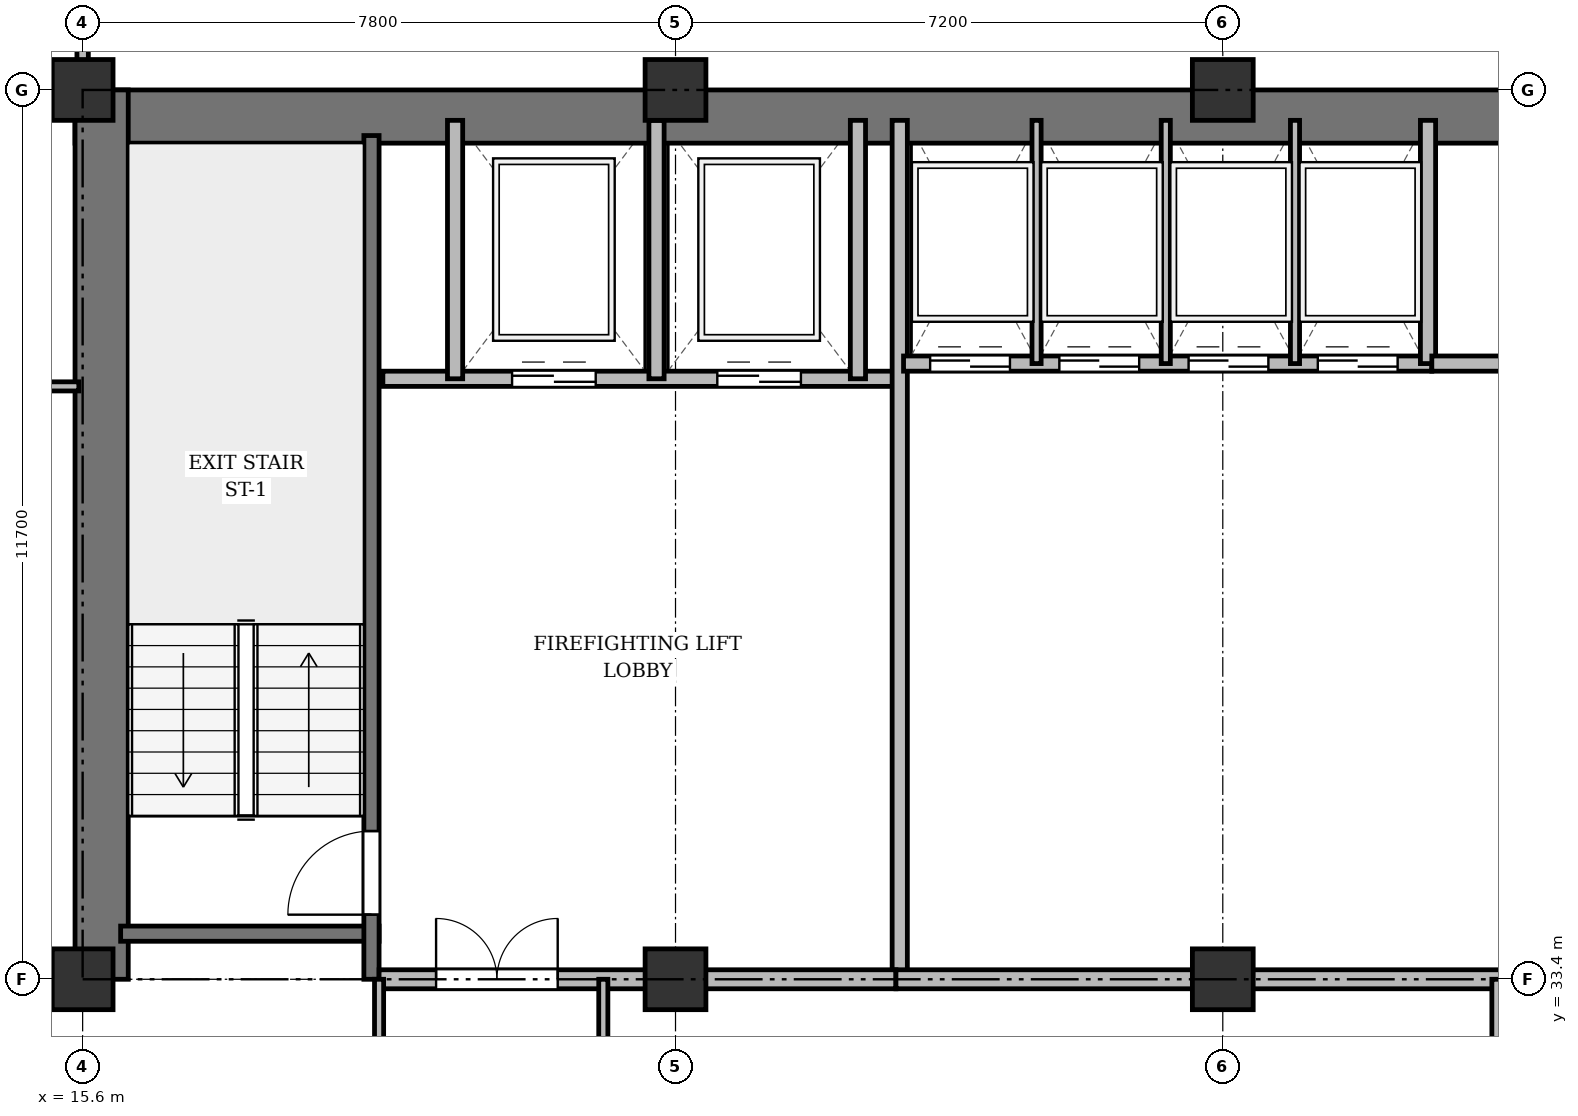
"""IFC4 building model, lengths in metres.
Left out: names, types, materials, properties, quantities, classifications, styles, units other than length and angle.
Written with IfcOpenShell. Run it as: python <this file> out.ifc"""

import sys

from ifc_helpers import new_model, si_unit, direction, frame, frame_2d, origin, origin_2d, place, context, subcontext, project, spatial, rectangle, extrude, source, transform, mapped, element, fill, save


model = new_model("IFC4")
c1 = context("Model", 3, precision=1e-05, world=origin(), true_north=direction((0.0, 1.0)))
c2 = subcontext(c1, "Body", "Model", "MODEL_VIEW")
j1 = project(units=[si_unit("LENGTHUNIT", "METRE"), si_unit("PLANEANGLEUNIT", "RADIAN")], contexts=[c1])
p1 = place(None, origin())
s1 = spatial("IfcSite", under=j1, at=p1, CompositionType="ELEMENT")
p2 = place(p1, origin())
s2 = spatial("IfcBuilding", under=s1, at=p2, CompositionType="ELEMENT")
p3 = place(p2, frame((0.0, 0.0, 121.3)))
s3 = spatial("IfcBuildingStorey", under=s2, at=p3, CompositionType="ELEMENT", Elevation=121.3)
m1 = source(origin(), c2, "Body", "SweptSolid", [
    extrude(rectangle(XDim=0.8, YDim=0.8, at=origin_2d()), origin(), (0.0, 0.0, 1.0), 3.6),
])
for number, where, z_axis, x_axis in (
    (1, (15.6, 33.4, 0.0), (0.0, 0.0, 1.0), (1.0, 0.0, 0.0)),
    (2, (15.6, 45.1, 0.0), (0.0, 0.0, 1.0), (1.0, 0.0, 0.0)),
    (3, (23.4, 33.4, 0.0), (0.0, 0.0, 1.0), (1.0, 0.0, 0.0)),
    (4, (23.4, 45.1, 0.0), (0.0, 0.0, 1.0), (1.0, 0.0, 0.0)),
    (5, (30.6, 33.4, 0.0), (0.0, 0.0, 1.0), (1.0, 0.0, 0.0)),
    (6, (30.6, 45.1, 0.0), (0.0, 0.0, 1.0), (1.0, 0.0, 0.0)),
):
    element("IfcColumn", number, at=place(p3, frame(where, z_axis=z_axis, x_axis=x_axis)), inside=s3, PredefinedType="COLUMN", context=c2, shape_type="MappedRepresentation", body=[
        mapped(m1, transform((0.0, 0.0, 0.0), x_axis=(1.0, 0.0, 0.0), y_axis=(0.0, 1.0, 0.0), z_axis=(0.0, 0.0, 1.0), scale=1.0)),
    ])
p4 = place(p3, frame((15.5, 44.75, 0.0), z_axis=(0.0, 0.0, 1.0), x_axis=(1.0, 0.0, 0.0)))
e7 = element("IfcWall", 7, at=p4, inside=s3, PredefinedType="SHEAR", context=c2, shape_type="SweptSolid", body=[
    extrude(rectangle(XDim=43.4, YDim=0.7, at=frame_2d((21.7, 0.0))), origin(), (0.0, 0.0, 1.0), 3.34),
])
p5 = place(p3, frame((15.85, 33.4, 0.0), z_axis=(0.0, 0.0, 1.0), x_axis=(0.0, 1.0, 0.0)))
e8 = element("IfcWall", 8, at=p5, inside=s3, PredefinedType="SHEAR", context=c2, shape_type="SweptSolid", body=[
    extrude(rectangle(XDim=11.7, YDim=0.7, at=frame_2d((5.85, 0.0))), origin(), (0.0, 0.0, 1.0), 3.34),
])
p6 = place(p3, frame((16.1, 34.0, 0.0), z_axis=(0.0, 0.0, 1.0), x_axis=(1.0, 0.0, 0.0)))
e9 = element("IfcWall", 9, at=p6, inside=s3, PredefinedType="SHEAR", context=c2, shape_type="SweptSolid", body=[
    extrude(rectangle(XDim=3.4, YDim=0.2, at=frame_2d((1.7, 0.0))), origin(), (0.0, 0.0, 1.0), 3.34),
])
p7 = place(p3, frame((19.4, 33.4, 0.0), z_axis=(0.0, 0.0, 1.0), x_axis=(0.0, 1.0, 0.0)))
e10 = element("IfcWall", 10, at=p7, inside=s3, PredefinedType="SHEAR", context=c2, shape_type="SweptSolid", body=[
    extrude(rectangle(XDim=11.1, YDim=0.2, at=frame_2d((5.55, 0.0))), origin(), (0.0, 0.0, 1.0), 3.34),
])
p8 = place(p7, frame((0.85, 0.0, 0.0)))
e11 = element("IfcOpeningElement", 11, at=p8, cuts=e10, PredefinedType="OPENING", context=c2, shape_type="SweptSolid", body=[
    extrude(rectangle(XDim=1.1, YDim=2.15, at=frame_2d((0.55, 1.075))), frame((0.0, 0.11, 0.0), z_axis=(0.0, -1.0, 0.0), x_axis=(1.0, 0.0, 0.0)), (0.0, 0.0, 1.0), 0.22),
])
p9 = place(p3, frame((19.55, 41.3, 0.0), z_axis=(0.0, 0.0, 1.0), x_axis=(1.0, 0.0, 0.0)))
e12 = element("IfcWall", 12, at=p9, inside=s3, PredefinedType="SOLIDWALL", context=c2, shape_type="SweptSolid", body=[
    extrude(rectangle(XDim=6.75, YDim=0.2, at=frame_2d((3.375, 0.0))), origin(), (0.0, 0.0, 1.0), 3.34),
])
p10 = place(p9, frame((1.7, 0.0, 0.0)))
e13 = element("IfcOpeningElement", 13, at=p10, cuts=e12, PredefinedType="OPENING", context=c2, shape_type="SweptSolid", body=[
    extrude(rectangle(XDim=1.1, YDim=2.15, at=frame_2d((0.55, 1.075))), frame((0.0, 0.11, 0.0), z_axis=(0.0, -1.0, 0.0), x_axis=(1.0, 0.0, 0.0)), (0.0, 0.0, 1.0), 0.22),
])
p11 = place(p9, frame((4.4, 0.0, 0.0)))
e14 = element("IfcOpeningElement", 14, at=p11, cuts=e12, PredefinedType="OPENING", context=c2, shape_type="SweptSolid", body=[
    extrude(rectangle(XDim=1.1, YDim=2.15, at=frame_2d((0.55, 1.075))), frame((0.0, 0.11, 0.0), z_axis=(0.0, -1.0, 0.0), x_axis=(1.0, 0.0, 0.0)), (0.0, 0.0, 1.0), 0.22),
])
for number, where, z_axis, x_axis in (
    (15, (20.5, 41.3, 0.0), (0.0, 0.0, 1.0), (0.0, 1.0, 0.0)),
    (16, (23.15, 41.3, 0.0), (0.0, 0.0, 1.0), (0.0, 1.0, 0.0)),
    (17, (25.8, 41.3, 0.0), (0.0, 0.0, 1.0), (0.0, 1.0, 0.0)),
):
    element("IfcWall", number, at=place(p3, frame(where, z_axis=z_axis, x_axis=x_axis)), inside=s3, PredefinedType="SOLIDWALL", context=c2, shape_type="SweptSolid", body=[
        extrude(rectangle(XDim=3.4, YDim=0.2, at=frame_2d((1.7, 0.0))), origin(), (0.0, 0.0, 1.0), 3.34),
    ])
p12 = place(p3, frame((26.35, 33.4, 0.0), z_axis=(0.0, 0.0, 1.0), x_axis=(0.0, 1.0, 0.0)))
e18 = element("IfcWall", 18, at=p12, inside=s3, PredefinedType="SOLIDWALL", context=c2, shape_type="SweptSolid", body=[
    extrude(rectangle(XDim=11.3, YDim=0.2, at=frame_2d((5.65, 0.0))), origin(), (0.0, 0.0, 1.0), 2.752),
])
p13 = place(p3, frame((19.5, 33.4, 0.0), z_axis=(0.0, 0.0, 1.0), x_axis=(1.0, 0.0, 0.0)))
e19 = element("IfcWall", 19, at=p13, inside=s3, PredefinedType="PARTITIONING", context=c2, shape_type="SweptSolid", body=[
    extrude(rectangle(XDim=6.8, YDim=0.25, at=frame_2d((3.4, 0.0))), origin(), (0.0, 0.0, 1.0), 2.752),
])
p14 = place(p13, frame((0.75, 0.0, 0.0)))
e20 = element("IfcOpeningElement", 20, at=p14, cuts=e19, PredefinedType="OPENING", context=c2, shape_type="SweptSolid", body=[
    extrude(rectangle(XDim=1.6, YDim=2.2, at=frame_2d((0.8, 1.1))), frame((0.0, 0.135, 0.0), z_axis=(0.0, -1.0, 0.0), x_axis=(1.0, 0.0, 0.0)), (0.0, 0.0, 1.0), 0.27),
])
p15 = place(p3, frame((26.4, 41.5, 0.0), z_axis=(0.0, 0.0, 1.0), x_axis=(1.0, 0.0, 0.0)))
e21 = element("IfcWall", 21, at=p15, inside=s3, PredefinedType="SOLIDWALL", context=c2, shape_type="SweptSolid", body=[
    extrude(rectangle(XDim=6.95, YDim=0.2, at=frame_2d((3.475, 0.0))), origin(), (0.0, 0.0, 1.0), 3.34),
])
p16 = place(p15, frame((0.35, 0.0, 0.0)))
e22 = element("IfcOpeningElement", 22, at=p16, cuts=e21, PredefinedType="OPENING", context=c2, shape_type="SweptSolid", body=[
    extrude(rectangle(XDim=1.05, YDim=2.15, at=frame_2d((0.525, 1.075))), frame((0.0, 0.11, 0.0), z_axis=(0.0, -1.0, 0.0), x_axis=(1.0, 0.0, 0.0)), (0.0, 0.0, 1.0), 0.22),
])
p17 = place(p15, frame((2.05, 0.0, 0.0)))
e23 = element("IfcOpeningElement", 23, at=p17, cuts=e21, PredefinedType="OPENING", context=c2, shape_type="SweptSolid", body=[
    extrude(rectangle(XDim=1.05, YDim=2.15, at=frame_2d((0.525, 1.075))), frame((0.0, 0.11, 0.0), z_axis=(0.0, -1.0, 0.0), x_axis=(1.0, 0.0, 0.0)), (0.0, 0.0, 1.0), 0.22),
])
p18 = place(p15, frame((3.75, 0.0, 0.0)))
e24 = element("IfcOpeningElement", 24, at=p18, cuts=e21, PredefinedType="OPENING", context=c2, shape_type="SweptSolid", body=[
    extrude(rectangle(XDim=1.05, YDim=2.15, at=frame_2d((0.525, 1.075))), frame((0.0, 0.11, 0.0), z_axis=(0.0, -1.0, 0.0), x_axis=(1.0, 0.0, 0.0)), (0.0, 0.0, 1.0), 0.22),
])
p19 = place(p15, frame((5.45, 0.0, 0.0)))
e25 = element("IfcOpeningElement", 25, at=p19, cuts=e21, PredefinedType="OPENING", context=c2, shape_type="SweptSolid", body=[
    extrude(rectangle(XDim=1.05, YDim=2.15, at=frame_2d((0.525, 1.075))), frame((0.0, 0.11, 0.0), z_axis=(0.0, -1.0, 0.0), x_axis=(1.0, 0.0, 0.0)), (0.0, 0.0, 1.0), 0.22),
])
p20 = place(p3, frame((33.3, 41.5, 0.0), z_axis=(0.0, 0.0, 1.0), x_axis=(0.0, 1.0, 0.0)))
e26 = element("IfcWall", 26, at=p20, inside=s3, PredefinedType="SOLIDWALL", context=c2, shape_type="SweptSolid", body=[
    extrude(rectangle(XDim=3.2, YDim=0.2, at=frame_2d((1.6, 0.0))), origin(), (0.0, 0.0, 1.0), 3.34),
])
for number, where, z_axis, x_axis in (
    (27, (28.15, 41.5, 0.0), (0.0, 0.0, 1.0), (0.0, 1.0, 0.0)),
    (28, (29.85, 41.5, 0.0), (0.0, 0.0, 1.0), (0.0, 1.0, 0.0)),
    (29, (31.55, 41.5, 0.0), (0.0, 0.0, 1.0), (0.0, 1.0, 0.0)),
):
    element("IfcWall", number, at=place(p3, frame(where, z_axis=z_axis, x_axis=x_axis)), inside=s3, PredefinedType="PARTITIONING", context=c2, shape_type="SweptSolid", body=[
        extrude(rectangle(XDim=3.2, YDim=0.12, at=frame_2d((1.6, 0.0))), origin(), (0.0, 0.0, 1.0), 3.34),
    ])
p21 = place(p3, frame((33.35, 41.5, 0.0), z_axis=(0.0, 0.0, 1.0), x_axis=(1.0, 0.0, 0.0)))
e30 = element("IfcWall", 30, at=p21, inside=s3, PredefinedType="SOLIDWALL", context=c2, shape_type="SweptSolid", body=[
    extrude(rectangle(XDim=6.9, YDim=0.2, at=frame_2d((3.45, 0.0))), origin(), (0.0, 0.0, 1.0), 3.34),
])
p22 = place(p3, frame((26.3, 33.4, 0.0), z_axis=(0.0, 0.0, 1.0), x_axis=(1.0, 0.0, 0.0)))
e31 = element("IfcWall", 31, at=p22, inside=s3, PredefinedType="PARTITIONING", context=c2, shape_type="SweptSolid", body=[
    extrude(rectangle(XDim=20.85, YDim=0.25, at=frame_2d((10.425, 0.0))), origin(), (0.0, 0.0, 1.0), 2.752),
])
p23 = place(p22, frame((9.2, 0.0, 0.0)))
e32 = element("IfcOpeningElement", 32, at=p23, cuts=e31, PredefinedType="OPENING", context=c2, shape_type="SweptSolid", body=[
    extrude(rectangle(XDim=1.6, YDim=2.2, at=frame_2d((0.8, 1.1))), frame((0.0, 0.135, 0.0), z_axis=(0.0, -1.0, 0.0), x_axis=(1.0, 0.0, 0.0)), (0.0, 0.0, 1.0), 0.27),
])
for number, where, z_axis, x_axis in (
    (33, (19.5, 29.8, 0.0), (0.0, 0.0, 1.0), (0.0, 1.0, 0.0)),
    (34, (22.45, 29.8, 0.0), (0.0, 0.0, 1.0), (0.0, 1.0, 0.0)),
    (35, (34.2, 29.8, 0.0), (0.0, 0.0, 1.0), (0.0, 1.0, 0.0)),
):
    element("IfcWall", number, at=place(p3, frame(where, z_axis=z_axis, x_axis=x_axis)), inside=s3, PredefinedType="PARTITIONING", context=c2, shape_type="SweptSolid", body=[
        extrude(rectangle(XDim=3.6, YDim=0.12, at=frame_2d((1.8, 0.0))), origin(), (0.0, 0.0, 1.0), 2.752),
    ])
p24 = place(p3, frame((4.8, 41.2, 0.0), z_axis=(0.0, 0.0, 1.0), x_axis=(1.0, 0.0, 0.0)))
e36 = element("IfcWall", 36, at=p24, inside=s3, PredefinedType="PARTITIONING", context=c2, shape_type="SweptSolid", body=[
    extrude(rectangle(XDim=10.75, YDim=0.12, at=frame_2d((5.375, 0.0))), origin(), (0.0, 0.0, 1.0), 2.84),
])
p25 = place(p24, frame((4.9, 0.0, 0.0)))
e37 = element("IfcOpeningElement", 37, at=p25, cuts=e36, PredefinedType="OPENING", context=c2, shape_type="SweptSolid", body=[
    extrude(rectangle(XDim=0.95, YDim=2.15, at=frame_2d((0.475, 1.075))), frame((0.0, 0.07, 0.0), z_axis=(0.0, -1.0, 0.0), x_axis=(1.0, 0.0, 0.0)), (0.0, 0.0, 1.0), 0.14),
])
p26 = place(p3, frame((4.75, 33.4, 0.0), z_axis=(0.0, 0.0, 1.0), x_axis=(1.0, 0.0, 0.0)))
e38 = element("IfcWall", 38, at=p26, inside=s3, PredefinedType="PARTITIONING", context=c2, shape_type="SweptSolid", body=[
    extrude(rectangle(XDim=10.85, YDim=0.15, at=frame_2d((5.425, 0.0))), origin(), (0.0, 0.0, 1.0), 2.752),
])
p27 = place(p26, frame((4.94, 0.0, 0.0)))
e39 = element("IfcOpeningElement", 39, at=p27, cuts=e38, PredefinedType="OPENING", context=c2, shape_type="SweptSolid", body=[
    extrude(rectangle(XDim=0.95, YDim=2.15, at=frame_2d((0.475, 1.075))), frame((0.0, 0.085, 0.0), z_axis=(0.0, -1.0, 0.0), x_axis=(1.0, 0.0, 0.0)), (0.0, 0.0, 1.0), 0.17),
])
p28 = place(p3, frame((15.6, 44.75, 0.0), z_axis=(0.0, 0.0, 1.0), x_axis=(0.0, 1.0, 0.0)))
e40 = element("IfcWall", 40, at=p28, inside=s3, PredefinedType="PARTITIONING", context=c2, shape_type="SweptSolid", body=[
    extrude(rectangle(XDim=3.61, YDim=0.15, at=frame_2d((1.805, 0.0))), origin(), (0.0, 0.0, 1.0), 2.84),
])
p29 = place(p28, frame((1.1, 0.0, 0.0)))
e41 = element("IfcOpeningElement", 41, at=p29, cuts=e40, PredefinedType="OPENING", context=c2, shape_type="SweptSolid", body=[
    extrude(rectangle(XDim=0.95, YDim=2.15, at=frame_2d((0.475, 1.075))), frame((0.0, 0.085, 0.0), z_axis=(0.0, -1.0, 0.0), x_axis=(1.0, 0.0, 0.0)), (0.0, 0.0, 1.0), 0.17),
])
m2 = source(origin(), c2, "Body", "SweptSolid", [
    extrude(rectangle(XDim=1.1, YDim=2.15, at=frame_2d((0.55, 1.075))), frame((0.0, 0.025, 0.0), z_axis=(0.0, -1.0, 0.0), x_axis=(1.0, 0.0, 0.0)), (0.0, 0.0, 1.0), 0.05),
])
p30 = place(p8, origin())
e42 = element("IfcDoor", 42, at=p30, inside=s3, OperationType="SINGLE_SWING_LEFT", PredefinedType="DOOR", context=c2, shape_type="MappedRepresentation", body=[
    mapped(m2, transform((0.0, 0.0, 0.0), x_axis=(1.0, 0.0, 0.0), y_axis=(0.0, 1.0, 0.0), z_axis=(0.0, 0.0, 1.0), scale=1.0)),
])
fill(e11, e42)
p31 = place(p10, origin())
e43 = element("IfcDoor", 43, at=p31, inside=s3, OperationType="DOUBLE_DOOR_SLIDING", PredefinedType="DOOR", context=c2, shape_type="MappedRepresentation", body=[
    mapped(m2, transform((0.0, 0.0, 0.0), x_axis=(1.0, 0.0, 0.0), y_axis=(0.0, 1.0, 0.0), z_axis=(0.0, 0.0, 1.0), scale=1.0)),
])
fill(e13, e43)
p32 = place(p11, origin())
e44 = element("IfcDoor", 44, at=p32, inside=s3, OperationType="DOUBLE_DOOR_SLIDING", PredefinedType="DOOR", context=c2, shape_type="MappedRepresentation", body=[
    mapped(m2, transform((0.0, 0.0, 0.0), x_axis=(1.0, 0.0, 0.0), y_axis=(0.0, 1.0, 0.0), z_axis=(0.0, 0.0, 1.0), scale=1.0)),
])
fill(e14, e44)
m3 = source(origin(), c2, "Body", "SweptSolid", [
    extrude(rectangle(XDim=1.6, YDim=2.2, at=frame_2d((0.8, 1.1))), frame((0.0, 0.025, 0.0), z_axis=(0.0, -1.0, 0.0), x_axis=(1.0, 0.0, 0.0)), (0.0, 0.0, 1.0), 0.05),
])
p33 = place(p14, origin())
e45 = element("IfcDoor", 45, at=p33, inside=s3, OperationType="DOUBLE_DOOR_SINGLE_SWING", PredefinedType="DOOR", context=c2, shape_type="MappedRepresentation", body=[
    mapped(m3, transform((0.0, 0.0, 0.0), x_axis=(1.0, 0.0, 0.0), y_axis=(0.0, 1.0, 0.0), z_axis=(0.0, 0.0, 1.0), scale=1.0)),
])
fill(e20, e45)
m4 = source(origin(), c2, "Body", "SweptSolid", [
    extrude(rectangle(XDim=1.05, YDim=2.15, at=frame_2d((0.525, 1.075))), frame((0.0, 0.025, 0.0), z_axis=(0.0, -1.0, 0.0), x_axis=(1.0, 0.0, 0.0)), (0.0, 0.0, 1.0), 0.05),
])
p34 = place(p16, origin())
e46 = element("IfcDoor", 46, at=p34, inside=s3, OperationType="DOUBLE_DOOR_SLIDING", PredefinedType="DOOR", context=c2, shape_type="MappedRepresentation", body=[
    mapped(m4, transform((0.0, 0.0, 0.0), x_axis=(1.0, 0.0, 0.0), y_axis=(0.0, 1.0, 0.0), z_axis=(0.0, 0.0, 1.0), scale=1.0)),
])
fill(e22, e46)
p35 = place(p17, origin())
e47 = element("IfcDoor", 47, at=p35, inside=s3, OperationType="DOUBLE_DOOR_SLIDING", PredefinedType="DOOR", context=c2, shape_type="MappedRepresentation", body=[
    mapped(m4, transform((0.0, 0.0, 0.0), x_axis=(1.0, 0.0, 0.0), y_axis=(0.0, 1.0, 0.0), z_axis=(0.0, 0.0, 1.0), scale=1.0)),
])
fill(e23, e47)
p36 = place(p18, origin())
e48 = element("IfcDoor", 48, at=p36, inside=s3, OperationType="DOUBLE_DOOR_SLIDING", PredefinedType="DOOR", context=c2, shape_type="MappedRepresentation", body=[
    mapped(m4, transform((0.0, 0.0, 0.0), x_axis=(1.0, 0.0, 0.0), y_axis=(0.0, 1.0, 0.0), z_axis=(0.0, 0.0, 1.0), scale=1.0)),
])
fill(e24, e48)
p37 = place(p19, origin())
e49 = element("IfcDoor", 49, at=p37, inside=s3, OperationType="DOUBLE_DOOR_SLIDING", PredefinedType="DOOR", context=c2, shape_type="MappedRepresentation", body=[
    mapped(m4, transform((0.0, 0.0, 0.0), x_axis=(1.0, 0.0, 0.0), y_axis=(0.0, 1.0, 0.0), z_axis=(0.0, 0.0, 1.0), scale=1.0)),
])
fill(e25, e49)
save(model, sys.argv[1])
